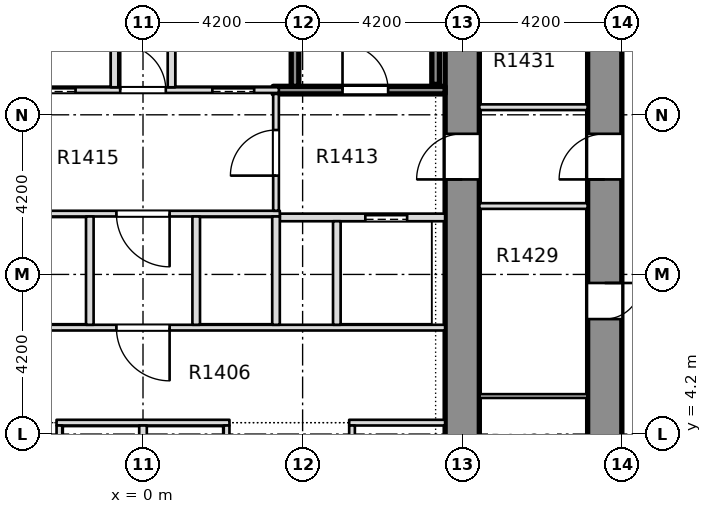
"""IFC4 building model, lengths in metres.
Left out: names, types, materials, properties, quantities, classifications, styles, units other than length and angle.
Written with IfcOpenShell. Run it as: python <this file> out.ifc"""

import sys

from ifc_helpers import new_model, si_unit, direction, frame, frame_2d, origin, place, context, subcontext, project, spatial, rectangle, extrude, element, fill, save


model = new_model("IFC4")
c1 = context("Model", 3, precision=1e-05, world=origin(), true_north=direction((0.0, 1.0)))
c2 = subcontext(c1, "Body", "Model", "MODEL_VIEW")
j1 = project(units=[si_unit("LENGTHUNIT", "METRE"), si_unit("PLANEANGLEUNIT", "RADIAN")], contexts=[c1])
p1 = place(None, origin())
s1 = spatial("IfcSite", under=j1, at=p1, CompositionType="ELEMENT")
p2 = place(p1, origin())
s2 = spatial("IfcBuilding", under=s1, at=p2, CompositionType="ELEMENT")
p3 = place(p2, frame((0.0, 0.0, 62.1)))
s3 = spatial("IfcBuildingStorey", under=s2, at=p3, CompositionType="ELEMENT", Elevation=62.1)
p4 = place(p3, frame((12.15, -8.4, -0.32), z_axis=(0.0, 0.0, 1.0), x_axis=(0.0, 1.0, 0.0)))
e1 = element("IfcWall", 1, at=p4, inside=s3, PredefinedType="SHEAR", context=c2, shape_type="SweptSolid", body=[
    extrude(rectangle(XDim=30.15, YDim=0.9, at=frame_2d((15.075, 0.0))), origin(), (0.0, 0.0, 1.0), 3.45),
])
p5 = place(p4, frame((3.425, 0.0, 0.32)))
e2 = element("IfcOpeningElement", 2, at=p5, cuts=e1, PredefinedType="OPENING", context=c2, shape_type="SweptSolid", body=[
    extrude(rectangle(XDim=0.95, YDim=2.1, at=frame_2d((0.475, 1.05))), frame((0.0, 0.46, 0.0), z_axis=(0.0, -1.0, 0.0), x_axis=(1.0, 0.0, 0.0)), (0.0, 0.0, 1.0), 0.92),
])
p6 = place(p4, frame((8.075, 0.0, 0.32)))
e3 = element("IfcOpeningElement", 3, at=p6, cuts=e1, PredefinedType="OPENING", context=c2, shape_type="SweptSolid", body=[
    extrude(rectangle(XDim=0.95, YDim=2.1, at=frame_2d((0.475, 1.05))), frame((0.0, 0.46, 0.0), z_axis=(0.0, -1.0, 0.0), x_axis=(1.0, 0.0, 0.0)), (0.0, 0.0, 1.0), 0.92),
])
p7 = place(p4, frame((11.425, 0.0, 0.32)))
e4 = element("IfcOpeningElement", 4, at=p7, cuts=e1, PredefinedType="OPENING", context=c2, shape_type="SweptSolid", body=[
    extrude(rectangle(XDim=0.95, YDim=2.1, at=frame_2d((0.475, 1.05))), frame((0.0, 0.46, 0.0), z_axis=(0.0, -1.0, 0.0), x_axis=(1.0, 0.0, 0.0)), (0.0, 0.0, 1.0), 0.92),
])
p8 = place(p4, frame((15.625, 0.0, 0.32)))
e5 = element("IfcOpeningElement", 5, at=p8, cuts=e1, PredefinedType="OPENING", context=c2, shape_type="SweptSolid", body=[
    extrude(rectangle(XDim=0.95, YDim=2.1, at=frame_2d((0.475, 1.05))), frame((0.0, 0.46, 0.0), z_axis=(0.0, -1.0, 0.0), x_axis=(1.0, 0.0, 0.0)), (0.0, 0.0, 1.0), 0.92),
])
p9 = place(p4, frame((22.725, 0.0, 0.32)))
e6 = element("IfcOpeningElement", 6, at=p9, cuts=e1, PredefinedType="OPENING", context=c2, shape_type="SweptSolid", body=[
    extrude(rectangle(XDim=0.95, YDim=2.1, at=frame_2d((0.475, 1.05))), frame((0.0, 0.46, 0.0), z_axis=(0.0, -1.0, 0.0), x_axis=(1.0, 0.0, 0.0)), (0.0, 0.0, 1.0), 0.92),
])
p10 = place(p4, frame((26.75, 0.0, 0.32)))
e7 = element("IfcOpeningElement", 7, at=p10, cuts=e1, PredefinedType="OPENING", context=c2, shape_type="SweptSolid", body=[
    extrude(rectangle(XDim=0.95, YDim=2.1, at=frame_2d((0.475, 1.05))), frame((0.0, 0.46, 0.0), z_axis=(0.0, -1.0, 0.0), x_axis=(1.0, 0.0, 0.0)), (0.0, 0.0, 1.0), 0.92),
])
p11 = place(p4, frame((19.3, 0.0, 0.32)))
e8 = element("IfcOpeningElement", 8, at=p11, cuts=e1, PredefinedType="OPENING", context=c2, shape_type="SweptSolid", body=[
    extrude(rectangle(XDim=1.2, YDim=2.1, at=frame_2d((0.6, 1.05))), frame((0.0, 0.46, 0.0), z_axis=(0.0, -1.0, 0.0), x_axis=(1.0, 0.0, 0.0)), (0.0, 0.0, 1.0), 0.92),
])
p12 = place(p3, frame((8.4, -7.5, -0.32), z_axis=(0.0, 0.0, 1.0), x_axis=(0.0, 1.0, 0.0)))
e9 = element("IfcWall", 9, at=p12, inside=s3, PredefinedType="SHEAR", context=c2, shape_type="SweptSolid", body=[
    extrude(rectangle(XDim=28.35, YDim=0.9, at=frame_2d((14.175, 0.0))), origin(), (0.0, 0.0, 1.0), 3.45),
])
p13 = place(p12, frame((18.4, 0.0, 0.32)))
e10 = element("IfcOpeningElement", 10, at=p13, cuts=e9, PredefinedType="OPENING", context=c2, shape_type="SweptSolid", body=[
    extrude(rectangle(XDim=1.2, YDim=2.1, at=frame_2d((0.6, 1.05))), frame((0.0, 0.46, 0.0), z_axis=(0.0, -1.0, 0.0), x_axis=(1.0, 0.0, 0.0)), (0.0, 0.0, 1.0), 0.92),
])
p14 = place(p3, frame((-2.275, 4.5, 0.0), z_axis=(0.0, 0.0, 1.0), x_axis=(1.0, 0.0, 0.0)))
e11 = element("IfcWall", 11, at=p14, inside=s3, PredefinedType="PARTITIONING", context=c2, shape_type="SweptSolid", body=[
    extrude(rectangle(XDim=4.55, YDim=0.15, at=frame_2d((2.275, 0.0))), origin(), (0.0, 0.0, 1.0), 3.13),
])
p15 = place(p3, frame((5.425, 4.5, 0.0), z_axis=(0.0, 0.0, 1.0), x_axis=(1.0, 0.0, 0.0)))
e12 = element("IfcWall", 12, at=p15, inside=s3, PredefinedType="PARTITIONING", context=c2, shape_type="SweptSolid", body=[
    extrude(rectangle(XDim=2.524, YDim=0.15, at=frame_2d((1.262, 0.0))), origin(), (0.0, 0.0, 1.0), 3.13),
])
p16 = place(p3, frame((-7.949, 7.0, 0.0), z_axis=(0.0, 0.0, 1.0), x_axis=(1.0, 0.0, 0.0)))
e13 = element("IfcWall", 13, at=p16, inside=s3, PredefinedType="PARTITIONING", context=c2, shape_type="SweptSolid", body=[
    extrude(rectangle(XDim=15.898, YDim=0.15, at=frame_2d((7.949, 0.0))), origin(), (0.0, 0.0, 1.0), 3.13),
])
p17 = place(p16, frame((7.249, 0.0, 0.0)))
e14 = element("IfcOpeningElement", 14, at=p17, cuts=e13, PredefinedType="OPENING", context=c2, shape_type="SweptSolid", body=[
    extrude(rectangle(XDim=1.4, YDim=2.1, at=frame_2d((0.7, 1.05))), frame((0.0, 0.085, 0.0), z_axis=(0.0, -1.0, 0.0), x_axis=(1.0, 0.0, 0.0)), (0.0, 0.0, 1.0), 0.17),
])
p18 = place(p3, frame((3.6, 9.9, 0.0), z_axis=(0.0, 0.0, 1.0), x_axis=(1.0, 0.0, 0.0)))
e15 = element("IfcWall", 15, at=p18, inside=s3, PredefinedType="PARTITIONING", context=c2, shape_type="SweptSolid", body=[
    extrude(rectangle(XDim=4.349, YDim=0.2, at=frame_2d((2.174, 0.0))), origin(), (0.0, 0.0, 1.0), 3.13),
])
p19 = place(p18, frame((2.25, 0.0, 0.0)))
e16 = element("IfcOpeningElement", 16, at=p19, cuts=e15, PredefinedType="OPENING", context=c2, shape_type="SweptSolid", body=[
    extrude(rectangle(XDim=1.1, YDim=2.1, at=frame_2d((0.55, 1.05))), frame((0.0, 0.11, 0.0), z_axis=(0.0, -1.0, 0.0), x_axis=(1.0, 0.0, 0.0)), (0.0, 0.0, 1.0), 0.22),
])
p20 = place(p3, frame((-3.6, 10.0, 0.0), z_axis=(0.0, 0.0, 1.0), x_axis=(1.0, 0.0, 0.0)))
e17 = element("IfcWall", 17, at=p20, inside=s3, PredefinedType="PARTITIONING", context=c2, shape_type="SweptSolid", body=[
    extrude(rectangle(XDim=7.2, YDim=0.15, at=frame_2d((3.6, 0.0))), origin(), (0.0, 0.0, 1.0), 3.13),
])
p21 = place(p20, frame((2.9, 0.0, 0.0)))
e18 = element("IfcOpeningElement", 18, at=p21, cuts=e17, PredefinedType="OPENING", context=c2, shape_type="SweptSolid", body=[
    extrude(rectangle(XDim=1.4, YDim=2.1, at=frame_2d((0.7, 1.05))), frame((0.0, 0.085, 0.0), z_axis=(0.0, -1.0, 0.0), x_axis=(1.0, 0.0, 0.0)), (0.0, 0.0, 1.0), 0.17),
])
p22 = place(p3, frame((-3.575, 13.25, 0.0), z_axis=(0.0, 0.0, 1.0), x_axis=(1.0, 0.0, 0.0)))
e19 = element("IfcWall", 19, at=p22, inside=s3, PredefinedType="PARTITIONING", context=c2, shape_type="SweptSolid", body=[
    extrude(rectangle(XDim=7.15, YDim=0.15, at=frame_2d((3.575, 0.0))), origin(), (0.0, 0.0, 1.0), 3.13),
])
p23 = place(p22, frame((0.6, 0.0, 0.0)))
e20 = element("IfcOpeningElement", 20, at=p23, cuts=e19, PredefinedType="OPENING", context=c2, shape_type="SweptSolid", body=[
    extrude(rectangle(XDim=1.2, YDim=2.1, at=frame_2d((0.6, 1.05))), frame((0.0, 0.085, 0.0), z_axis=(0.0, -1.0, 0.0), x_axis=(1.0, 0.0, 0.0)), (0.0, 0.0, 1.0), 0.17),
])
p24 = place(p22, frame((5.4, 0.0, 0.0)))
e21 = element("IfcOpeningElement", 21, at=p24, cuts=e19, PredefinedType="OPENING", context=c2, shape_type="SweptSolid", body=[
    extrude(rectangle(XDim=1.1, YDim=2.1, at=frame_2d((0.55, 1.05))), frame((0.0, 0.085, 0.0), z_axis=(0.0, -1.0, 0.0), x_axis=(1.0, 0.0, 0.0)), (0.0, 0.0, 1.0), 0.17),
])
p25 = place(p22, frame((2.975, 0.0, 0.0)))
e22 = element("IfcOpeningElement", 22, at=p25, cuts=e19, PredefinedType="OPENING", context=c2, shape_type="SweptSolid", body=[
    extrude(rectangle(XDim=1.2, YDim=2.1, at=frame_2d((0.6, 1.05))), frame((0.0, 0.085, 0.0), z_axis=(0.0, -1.0, 0.0), x_axis=(1.0, 0.0, 0.0)), (0.0, 0.0, 1.0), 0.17),
])
p26 = place(p3, frame((3.425, 13.25, 0.0), z_axis=(0.0, 0.0, 1.0), x_axis=(1.0, 0.0, 0.0)))
e23 = element("IfcWall", 23, at=p26, inside=s3, PredefinedType="SOLIDWALL", context=c2, shape_type="SweptSolid", body=[
    extrude(rectangle(XDim=4.524, YDim=0.2, at=frame_2d((2.262, 0.0))), origin(), (0.0, 0.0, 1.0), 3.13),
])
p27 = place(p26, frame((1.825, 0.0, 0.0)))
e24 = element("IfcOpeningElement", 24, at=p27, cuts=e23, PredefinedType="OPENING", context=c2, shape_type="SweptSolid", body=[
    extrude(rectangle(XDim=1.2, YDim=2.1, at=frame_2d((0.6, 1.05))), frame((0.0, 0.11, 0.0), z_axis=(0.0, -1.0, 0.0), x_axis=(1.0, 0.0, 0.0)), (0.0, 0.0, 1.0), 0.22),
])
p28 = place(p3, frame((-2.2, -7.499, 0.0), z_axis=(0.0, 0.0, 1.0), x_axis=(0.0, 1.0, 0.0)))
e25 = element("IfcWall", 25, at=p28, inside=s3, PredefinedType="PARTITIONING", context=c2, shape_type="SweptSolid", body=[
    extrude(rectangle(XDim=11.924, YDim=0.15, at=frame_2d((5.962, 0.0))), origin(), (0.0, 0.0, 1.0), 3.13),
])
p29 = place(p28, frame((0.949, 0.0, 0.0)))
e26 = element("IfcOpeningElement", 26, at=p29, cuts=e25, PredefinedType="OPENING", context=c2, shape_type="SweptSolid", body=[
    extrude(rectangle(XDim=1.1, YDim=2.1, at=frame_2d((0.55, 1.05))), frame((0.0, 0.085, 0.0), z_axis=(0.0, -1.0, 0.0), x_axis=(1.0, 0.0, 0.0)), (0.0, 0.0, 1.0), 0.17),
])
p30 = place(p28, frame((3.949, 0.0, 0.0)))
e27 = element("IfcOpeningElement", 27, at=p30, cuts=e25, PredefinedType="OPENING", context=c2, shape_type="SweptSolid", body=[
    extrude(rectangle(XDim=1.1, YDim=2.1, at=frame_2d((0.55, 1.05))), frame((0.0, 0.085, 0.0), z_axis=(0.0, -1.0, 0.0), x_axis=(1.0, 0.0, 0.0)), (0.0, 0.0, 1.0), 0.17),
])
p31 = place(p28, frame((6.949, 0.0, 0.0)))
e28 = element("IfcOpeningElement", 28, at=p31, cuts=e25, PredefinedType="OPENING", context=c2, shape_type="SweptSolid", body=[
    extrude(rectangle(XDim=1.1, YDim=2.1, at=frame_2d((0.55, 1.05))), frame((0.0, 0.085, 0.0), z_axis=(0.0, -1.0, 0.0), x_axis=(1.0, 0.0, 0.0)), (0.0, 0.0, 1.0), 0.17),
])
p32 = place(p28, frame((9.949, 0.0, 0.0)))
e29 = element("IfcOpeningElement", 29, at=p32, cuts=e25, PredefinedType="OPENING", context=c2, shape_type="SweptSolid", body=[
    extrude(rectangle(XDim=1.1, YDim=2.1, at=frame_2d((0.55, 1.05))), frame((0.0, 0.085, 0.0), z_axis=(0.0, -1.0, 0.0), x_axis=(1.0, 0.0, 0.0)), (0.0, 0.0, 1.0), 0.17),
])
p33 = place(p3, frame((-1.4, 7.075, 0.0), z_axis=(0.0, 0.0, 1.0), x_axis=(0.0, 1.0, 0.0)))
e30 = element("IfcWall", 30, at=p33, inside=s3, PredefinedType="PARTITIONING", context=c2, shape_type="SweptSolid", body=[
    extrude(rectangle(XDim=2.85, YDim=0.2, at=frame_2d((1.425, 0.0))), origin(), (0.0, 0.0, 1.0), 3.13),
])
p34 = place(p3, frame((-0.75, 13.325, 0.0), z_axis=(0.0, 0.0, 1.0), x_axis=(0.0, 1.0, 0.0)))
e31 = element("IfcWall", 31, at=p34, inside=s3, PredefinedType="PARTITIONING", context=c2, shape_type="SweptSolid", body=[
    extrude(rectangle(XDim=7.524, YDim=0.2, at=frame_2d((3.762, 0.0))), origin(), (0.0, 0.0, 1.0), 3.13),
])
p35 = place(p34, frame((4.8, 0.0, 0.0)))
e32 = element("IfcOpeningElement", 32, at=p35, cuts=e31, PredefinedType="OPENING", context=c2, shape_type="SweptSolid", body=[
    extrude(rectangle(XDim=0.95, YDim=2.1, at=frame_2d((0.475, 1.05))), frame((0.0, 0.11, 0.0), z_axis=(0.0, -1.0, 0.0), x_axis=(1.0, 0.0, 0.0)), (0.0, 0.0, 1.0), 0.22),
])
p36 = place(p3, frame((0.0, -7.499, 0.0), z_axis=(0.0, 0.0, 1.0), x_axis=(0.0, 1.0, 0.0)))
e33 = element("IfcWall", 33, at=p36, inside=s3, PredefinedType="PARTITIONING", context=c2, shape_type="SweptSolid", body=[
    extrude(rectangle(XDim=11.924, YDim=0.2, at=frame_2d((5.962, 0.0))), origin(), (0.0, 0.0, 1.0), 3.13),
])
p37 = place(p3, frame((0.75, 13.325, 0.0), z_axis=(0.0, 0.0, 1.0), x_axis=(0.0, 1.0, 0.0)))
e34 = element("IfcWall", 34, at=p37, inside=s3, PredefinedType="PARTITIONING", context=c2, shape_type="SweptSolid", body=[
    extrude(rectangle(XDim=2.625, YDim=0.2, at=frame_2d((1.312, 0.0))), origin(), (0.0, 0.0, 1.0), 3.13),
])
p38 = place(p3, frame((1.4, 7.075, 0.0), z_axis=(0.0, 0.0, 1.0), x_axis=(0.0, 1.0, 0.0)))
e35 = element("IfcWall", 35, at=p38, inside=s3, PredefinedType="PARTITIONING", context=c2, shape_type="SweptSolid", body=[
    extrude(rectangle(XDim=2.85, YDim=0.2, at=frame_2d((1.425, 0.0))), origin(), (0.0, 0.0, 1.0), 3.13),
])
p39 = place(p3, frame((2.2, -7.499, 0.0), z_axis=(0.0, 0.0, 1.0), x_axis=(0.0, 1.0, 0.0)))
e36 = element("IfcWall", 36, at=p39, inside=s3, PredefinedType="PARTITIONING", context=c2, shape_type="SweptSolid", body=[
    extrude(rectangle(XDim=11.924, YDim=0.15, at=frame_2d((5.962, 0.0))), origin(), (0.0, 0.0, 1.0), 3.13),
])
p40 = place(p3, frame((3.5, 7.075, 0.0), z_axis=(0.0, 0.0, 1.0), x_axis=(0.0, 1.0, 0.0)))
e37 = element("IfcWall", 37, at=p40, inside=s3, PredefinedType="PARTITIONING", context=c2, shape_type="SweptSolid", body=[
    extrude(rectangle(XDim=2.85, YDim=0.2, at=frame_2d((1.425, 0.0))), origin(), (0.0, 0.0, 1.0), 3.13),
])
p41 = place(p3, frame((3.5, 10.075, 0.0), z_axis=(0.0, 0.0, 1.0), x_axis=(0.0, 1.0, 0.0)))
e38 = element("IfcWall", 38, at=p41, inside=s3, PredefinedType="PARTITIONING", context=c2, shape_type="SweptSolid", body=[
    extrude(rectangle(XDim=3.075, YDim=0.15, at=frame_2d((1.538, 0.0))), origin(), (0.0, 0.0, 1.0), 3.13),
])
p42 = place(p41, frame((0.925, 0.0, 0.0)))
e39 = element("IfcOpeningElement", 39, at=p42, cuts=e38, PredefinedType="OPENING", context=c2, shape_type="SweptSolid", body=[
    extrude(rectangle(XDim=1.2, YDim=2.1, at=frame_2d((0.6, 1.05))), frame((0.0, 0.085, 0.0), z_axis=(0.0, -1.0, 0.0), x_axis=(1.0, 0.0, 0.0)), (0.0, 0.0, 1.0), 0.17),
])
p43 = place(p3, frame((4.0, 13.35, 0.0), z_axis=(0.0, 0.0, 1.0), x_axis=(0.0, 1.0, 0.0)))
e40 = element("IfcWall", 40, at=p43, inside=s3, PredefinedType="SOLIDWALL", context=c2, shape_type="SweptSolid", body=[
    extrude(rectangle(XDim=2.6, YDim=0.2, at=frame_2d((1.3, 0.0))), origin(), (0.0, 0.0, 1.0), 3.13),
])
p44 = place(p3, frame((5.1, 7.075, 0.0), z_axis=(0.0, 0.0, 1.0), x_axis=(0.0, 1.0, 0.0)))
e41 = element("IfcWall", 41, at=p44, inside=s3, PredefinedType="PARTITIONING", context=c2, shape_type="SweptSolid", body=[
    extrude(rectangle(XDim=2.725, YDim=0.2, at=frame_2d((1.363, 0.0))), origin(), (0.0, 0.0, 1.0), 3.13),
])
p45 = place(p3, frame((5.5, -7.499, 0.0), z_axis=(0.0, 0.0, 1.0), x_axis=(0.0, 1.0, 0.0)))
e42 = element("IfcWall", 42, at=p45, inside=s3, PredefinedType="PARTITIONING", context=c2, shape_type="SweptSolid", body=[
    extrude(rectangle(XDim=11.924, YDim=0.15, at=frame_2d((5.962, 0.0))), origin(), (0.0, 0.0, 1.0), 3.13),
])
p46 = place(p45, frame((7.024, 0.0, 0.0)))
e43 = element("IfcOpeningElement", 43, at=p46, cuts=e42, PredefinedType="OPENING", context=c2, shape_type="SweptSolid", body=[
    extrude(rectangle(XDim=0.95, YDim=2.1, at=frame_2d((0.475, 1.05))), frame((0.0, 0.085, 0.0), z_axis=(0.0, -1.0, 0.0), x_axis=(1.0, 0.0, 0.0)), (0.0, 0.0, 1.0), 0.17),
])
p47 = place(p45, frame((10.024, 0.0, 0.0)))
e44 = element("IfcOpeningElement", 44, at=p47, cuts=e42, PredefinedType="OPENING", context=c2, shape_type="SweptSolid", body=[
    extrude(rectangle(XDim=0.95, YDim=2.1, at=frame_2d((0.475, 1.05))), frame((0.0, 0.085, 0.0), z_axis=(0.0, -1.0, 0.0), x_axis=(1.0, 0.0, 0.0)), (0.0, 0.0, 1.0), 0.17),
])
p48 = place(p3, frame((8.851, 5.2, 0.0), z_axis=(0.0, 0.0, 1.0), x_axis=(1.0, 0.0, 0.0)))
e45 = element("IfcWall", 45, at=p48, inside=s3, PredefinedType="PARTITIONING", context=c2, shape_type="SweptSolid", body=[
    extrude(rectangle(XDim=2.848, YDim=0.1, at=frame_2d((1.424, 0.0))), origin(), (0.0, 0.0, 1.0), 3.13),
])
for number, where, z_axis, x_axis in (
    (46, (8.851, 10.2, 0.0), (0.0, 0.0, 1.0), (1.0, 0.0, 0.0)),
    (47, (8.851, 12.8, 0.0), (0.0, 0.0, 1.0), (1.0, 0.0, 0.0)),
):
    element("IfcWall", number, at=place(p3, frame(where, z_axis=z_axis, x_axis=x_axis)), inside=s3, PredefinedType="PARTITIONING", context=c2, shape_type="SweptSolid", body=[
        extrude(rectangle(XDim=2.848, YDim=0.15, at=frame_2d((1.424, 0.0))), origin(), (0.0, 0.0, 1.0), 3.13),
    ])
p49 = place(p3, frame((7.7, 13.4, 0.0), z_axis=(0.0, 0.0, 1.0), x_axis=(0.0, 1.0, 0.0)))
e48 = element("IfcWall", 48, at=p49, inside=s3, PredefinedType="SOLIDWALL", context=c2, shape_type="SweptSolid", body=[
    extrude(rectangle(XDim=7.4, YDim=0.2, at=frame_2d((3.7, 0.0))), origin(), (0.0, 0.0, 1.0), 3.13),
])
p50 = place(p27, origin())
e49 = element("IfcDoor", 49, at=p50, inside=s3, OperationType="SINGLE_SWING_RIGHT", PredefinedType="DOOR", context=c2, shape_type="SweptSolid", body=[
    extrude(rectangle(XDim=1.2, YDim=2.1, at=frame_2d((0.6, 1.05))), frame((0.0, 0.025, 0.0), z_axis=(0.0, -1.0, 0.0), x_axis=(1.0, 0.0, 0.0)), (0.0, 0.0, 1.0), 0.05),
])
fill(e24, e49)
p51 = place(p19, origin())
e50 = element("IfcDoor", 50, at=p51, inside=s3, OperationType="SLIDING_TO_LEFT", PredefinedType="DOOR", context=c2, shape_type="SweptSolid", body=[
    extrude(rectangle(XDim=1.1, YDim=2.1, at=frame_2d((0.55, 1.05))), frame((0.0, 0.025, 0.0), z_axis=(0.0, -1.0, 0.0), x_axis=(1.0, 0.0, 0.0)), (0.0, 0.0, 1.0), 0.05),
])
fill(e16, e50)
p52 = place(p17, origin())
e51 = element("IfcDoor", 51, at=p52, inside=s3, OperationType="SINGLE_SWING_RIGHT", PredefinedType="DOOR", context=c2, shape_type="SweptSolid", body=[
    extrude(rectangle(XDim=1.4, YDim=2.1, at=frame_2d((0.7, 1.05))), frame((0.0, 0.025, 0.0), z_axis=(0.0, -1.0, 0.0), x_axis=(1.0, 0.0, 0.0)), (0.0, 0.0, 1.0), 0.05),
])
fill(e14, e51)
p53 = place(p21, origin())
e52 = element("IfcDoor", 52, at=p53, inside=s3, OperationType="SINGLE_SWING_RIGHT", PredefinedType="DOOR", context=c2, shape_type="SweptSolid", body=[
    extrude(rectangle(XDim=1.4, YDim=2.1, at=frame_2d((0.7, 1.05))), frame((0.0, 0.025, 0.0), z_axis=(0.0, -1.0, 0.0), x_axis=(1.0, 0.0, 0.0)), (0.0, 0.0, 1.0), 0.05),
])
fill(e18, e52)
p54 = place(p23, origin())
e53 = element("IfcDoor", 53, at=p54, inside=s3, OperationType="SLIDING_TO_RIGHT", PredefinedType="DOOR", context=c2, shape_type="SweptSolid", body=[
    extrude(rectangle(XDim=1.2, YDim=2.1, at=frame_2d((0.6, 1.05))), frame((0.0, 0.025, 0.0), z_axis=(0.0, -1.0, 0.0), x_axis=(1.0, 0.0, 0.0)), (0.0, 0.0, 1.0), 0.05),
])
fill(e20, e53)
p55 = place(p24, origin())
e54 = element("IfcDoor", 54, at=p55, inside=s3, OperationType="SLIDING_TO_LEFT", PredefinedType="DOOR", context=c2, shape_type="SweptSolid", body=[
    extrude(rectangle(XDim=1.1, YDim=2.1, at=frame_2d((0.55, 1.05))), frame((0.0, 0.025, 0.0), z_axis=(0.0, -1.0, 0.0), x_axis=(1.0, 0.0, 0.0)), (0.0, 0.0, 1.0), 0.05),
])
fill(e21, e54)
p56 = place(p25, origin())
e55 = element("IfcDoor", 55, at=p56, inside=s3, OperationType="SINGLE_SWING_RIGHT", PredefinedType="DOOR", context=c2, shape_type="SweptSolid", body=[
    extrude(rectangle(XDim=1.2, YDim=2.1, at=frame_2d((0.6, 1.05))), frame((0.0, 0.025, 0.0), z_axis=(0.0, -1.0, 0.0), x_axis=(1.0, 0.0, 0.0)), (0.0, 0.0, 1.0), 0.05),
])
fill(e22, e55)
p57 = place(p42, origin())
e56 = element("IfcDoor", 56, at=p57, inside=s3, OperationType="SINGLE_SWING_LEFT", PredefinedType="DOOR", context=c2, shape_type="SweptSolid", body=[
    extrude(rectangle(XDim=1.2, YDim=2.1, at=frame_2d((0.6, 1.05))), frame((0.0, 0.025, 0.0), z_axis=(0.0, -1.0, 0.0), x_axis=(1.0, 0.0, 0.0)), (0.0, 0.0, 1.0), 0.05),
])
fill(e39, e56)
p58 = place(p8, origin())
e57 = element("IfcDoor", 57, at=p58, inside=s3, OperationType="SINGLE_SWING_LEFT", PredefinedType="DOOR", context=c2, shape_type="SweptSolid", body=[
    extrude(rectangle(XDim=0.95, YDim=2.1, at=frame_2d((0.475, 1.05))), frame((0.0, 0.025, 0.0), z_axis=(0.0, -1.0, 0.0), x_axis=(1.0, 0.0, 0.0)), (0.0, 0.0, 1.0), 0.05),
])
fill(e5, e57)
p59 = place(p11, origin())
e58 = element("IfcDoor", 58, at=p59, inside=s3, OperationType="SINGLE_SWING_LEFT", PredefinedType="DOOR", context=c2, shape_type="SweptSolid", body=[
    extrude(rectangle(XDim=1.2, YDim=2.1, at=frame_2d((0.6, 1.05))), frame((0.0, 0.025, 0.0), z_axis=(0.0, -1.0, 0.0), x_axis=(1.0, 0.0, 0.0)), (0.0, 0.0, 1.0), 0.05),
])
fill(e8, e58)
p60 = place(p13, origin())
e59 = element("IfcDoor", 59, at=p60, inside=s3, OperationType="SINGLE_SWING_LEFT", PredefinedType="DOOR", context=c2, shape_type="SweptSolid", body=[
    extrude(rectangle(XDim=1.2, YDim=2.1, at=frame_2d((0.6, 1.05))), frame((0.0, 0.025, 0.0), z_axis=(0.0, -1.0, 0.0), x_axis=(1.0, 0.0, 0.0)), (0.0, 0.0, 1.0), 0.05),
])
fill(e10, e59)
save(model, sys.argv[1])
